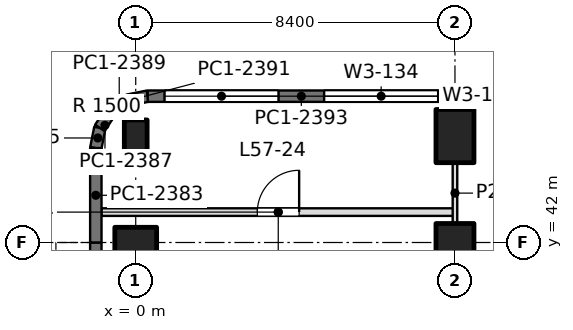
"""IFC4 building model, lengths in metres.
Left out: names, types, materials, properties, quantities, classifications, styles, units other than length and angle.
Written with IfcOpenShell. Run it as: python <this file> out.ifc"""

import sys

from ifc_helpers import new_model, si_unit, direction, frame, frame_2d, origin, origin_2d, place, context, subcontext, project, spatial, rectangle, extrude, element, fill, save


model = new_model("IFC4")
c1 = context("Model", 3, precision=1e-05, world=origin(), true_north=direction((0.0, 1.0)))
c2 = subcontext(c1, "Body", "Model", "MODEL_VIEW")
j1 = project(units=[si_unit("LENGTHUNIT", "METRE"), si_unit("PLANEANGLEUNIT", "RADIAN")], contexts=[c1])
p1 = place(None, origin())
s1 = spatial("IfcSite", under=j1, at=p1, CompositionType="ELEMENT")
p2 = place(p1, origin())
s2 = spatial("IfcBuilding", under=s1, at=p2, CompositionType="ELEMENT")
p3 = place(p2, frame((0.0, 0.0, 250.2)))
s3 = spatial("IfcBuildingStorey", under=s2, at=p3, CompositionType="ELEMENT", Elevation=250.2)
p4 = place(p3, frame((0.0, 42.0, 0.0), z_axis=(0.0, 0.0, 1.0), x_axis=(0.0, 1.0, 0.0)))
e1 = element("IfcColumn", 1, at=p4, inside=s3, PredefinedType="COLUMN", context=c2, shape_type="SweptSolid", body=[
    extrude(rectangle(XDim=0.8, YDim=1.1, at=origin_2d()), origin(), (0.0, 0.0, 1.0), 4.5),
])
p5 = place(p3, frame((0.0, 44.8, 0.0), z_axis=(0.0, 0.0, 1.0), x_axis=(1.0, 0.0, 0.0)))
e2 = element("IfcColumn", 2, at=p5, inside=s3, PredefinedType="COLUMN", context=c2, shape_type="SweptSolid", body=[
    extrude(rectangle(XDim=0.6, YDim=0.85, at=origin_2d()), origin(), (0.0, 0.0, 1.0), 4.5),
])
p6 = place(p3, frame((8.4, 42.0, 0.0), z_axis=(0.0, 0.0, 1.0), x_axis=(1.0, 0.0, 0.0)))
e3 = element("IfcColumn", 3, at=p6, inside=s3, PredefinedType="COLUMN", context=c2, shape_type="SweptSolid", body=[
    extrude(rectangle(XDim=1.0, YDim=1.0, at=origin_2d()), origin(), (0.0, 0.0, 1.0), 4.5),
])
p7 = place(p3, frame((8.4, 44.8, 0.0), z_axis=(0.0, 0.0, 1.0), x_axis=(1.0, 0.0, 0.0)))
e4 = element("IfcColumn", 4, at=p7, inside=s3, PredefinedType="COLUMN", context=c2, shape_type="SweptSolid", body=[
    extrude(rectangle(XDim=1.0, YDim=1.4, at=origin_2d()), origin(), (0.0, 0.0, 1.0), 4.5),
])
p8 = place(p3, frame((-1.05, 37.65, 0.0), z_axis=(0.0, 0.0, 1.0), x_axis=(0.0, 1.0, 0.0)))
e5 = element("IfcWall", 5, at=p8, inside=s3, PredefinedType="SOLIDWALL", context=c2, shape_type="SweptSolid", body=[
    extrude(rectangle(XDim=4.35, YDim=0.3, at=frame_2d((2.175, 0.0))), origin(), (0.0, 0.0, 1.0), 4.35),
])
p9 = place(p8, frame((0.975, 0.0, 0.9)))
e6 = element("IfcOpeningElement", 6, at=p9, cuts=e5, PredefinedType="OPENING", context=c2, shape_type="SweptSolid", body=[
    extrude(rectangle(XDim=2.4, YDim=1.9, at=frame_2d((1.2, 0.95))), frame((0.0, 0.16, 0.0), z_axis=(0.0, -1.0, 0.0), x_axis=(1.0, 0.0, 0.0)), (0.0, 0.0, 1.0), 0.32),
])
p10 = place(p3, frame((-1.05, 42.0, 0.0), z_axis=(0.0, 0.0, 1.0), x_axis=(0.0, 1.0, 0.0)))
e7 = element("IfcWall", 7, at=p10, inside=s3, PredefinedType="SOLIDWALL", context=c2, shape_type="SweptSolid", body=[
    extrude(rectangle(XDim=2.485, YDim=0.3, at=frame_2d((1.243, 0.0))), origin(), (0.0, 0.0, 1.0), 4.35),
])
p11 = place(p3, frame((-1.05, 44.485, 0.0), z_axis=(0.0, 0.0, 1.0), x_axis=(0.195073962632, 0.980788534345, 0.0)))
e8 = element("IfcWall", 8, at=p11, inside=s3, PredefinedType="SOLIDWALL", context=c2, shape_type="SweptSolid", body=[
    extrude(rectangle(XDim=0.541, YDim=0.3, at=frame_2d((0.271, 0.0))), origin(), (0.0, 0.0, 1.0), 4.35),
])
p12 = place(p3, frame((-0.945, 45.015, 0.0), z_axis=(0.0, 0.0, 1.0), x_axis=(0.55534295404, 0.831621430339, 0.0)))
e9 = element("IfcWall", 9, at=p12, inside=s3, PredefinedType="SOLIDWALL", context=c2, shape_type="SweptSolid", body=[
    extrude(rectangle(XDim=0.526, YDim=0.3, at=frame_2d((0.263, 0.0))), origin(), (0.0, 0.0, 1.0), 4.35),
])
p13 = place(p3, frame((-0.653, 45.453, 0.0), z_axis=(0.0, 0.0, 1.0), x_axis=(0.831692711774, 0.555236195849, 0.0)))
e10 = element("IfcWall", 10, at=p13, inside=s3, PredefinedType="SOLIDWALL", context=c2, shape_type="SweptSolid", body=[
    extrude(rectangle(XDim=0.525, YDim=0.3, at=frame_2d((0.263, 0.0))), origin(), (0.0, 0.0, 1.0), 4.35),
])
p14 = place(p3, frame((-0.216, 45.744, 0.0), z_axis=(0.0, 0.0, 1.0), x_axis=(0.980702050465, 0.1955082817, 0.0)))
e11 = element("IfcWall", 11, at=p14, inside=s3, PredefinedType="SOLIDWALL", context=c2, shape_type="SweptSolid", body=[
    extrude(rectangle(XDim=0.541, YDim=0.3, at=frame_2d((0.271, 0.0))), origin(), (0.0, 0.0, 1.0), 4.35),
])
p15 = place(p3, frame((0.315, 45.85, 0.0), z_axis=(0.0, 0.0, 1.0), x_axis=(1.0, 0.0, 0.0)))
e12 = element("IfcWall", 12, at=p15, inside=s3, PredefinedType="SOLIDWALL", context=c2, shape_type="SweptSolid", body=[
    extrude(rectangle(XDim=8.085, YDim=0.3, at=frame_2d((4.042, 0.0))), origin(), (0.0, 0.0, 1.0), 4.35),
])
p16 = place(p15, frame((0.443, 0.0, 0.9)))
e13 = element("IfcOpeningElement", 13, at=p16, cuts=e12, PredefinedType="OPENING", context=c2, shape_type="SweptSolid", body=[
    extrude(rectangle(XDim=3.0, YDim=2.4, at=frame_2d((1.5, 1.2))), frame((0.0, 0.16, 0.0), z_axis=(0.0, -1.0, 0.0), x_axis=(1.0, 0.0, 0.0)), (0.0, 0.0, 1.0), 0.32),
])
p17 = place(p15, frame((4.643, 0.0, 0.9)))
e14 = element("IfcOpeningElement", 14, at=p17, cuts=e12, PredefinedType="OPENING", context=c2, shape_type="SweptSolid", body=[
    extrude(rectangle(XDim=3.0, YDim=2.4, at=frame_2d((1.5, 1.2))), frame((0.0, 0.16, 0.0), z_axis=(0.0, -1.0, 0.0), x_axis=(1.0, 0.0, 0.0)), (0.0, 0.0, 1.0), 0.32),
])
p18 = place(p3, frame((8.4, 45.85, 0.0), z_axis=(0.0, 0.0, 1.0), x_axis=(1.0, 0.0, 0.0)))
e15 = element("IfcWall", 15, at=p18, inside=s3, PredefinedType="SOLIDWALL", context=c2, shape_type="SweptSolid", body=[
    extrude(rectangle(XDim=8.4, YDim=0.3, at=frame_2d((4.2, 0.0))), origin(), (0.0, 0.0, 1.0), 4.35),
])
p19 = place(p18, frame((0.6, 0.0, 0.9)))
e16 = element("IfcOpeningElement", 16, at=p19, cuts=e15, PredefinedType="OPENING", context=c2, shape_type="SweptSolid", body=[
    extrude(rectangle(XDim=3.0, YDim=2.4, at=frame_2d((1.5, 1.2))), frame((0.0, 0.16, 0.0), z_axis=(0.0, -1.0, 0.0), x_axis=(1.0, 0.0, 0.0)), (0.0, 0.0, 1.0), 0.32),
])
p20 = place(p18, frame((4.8, 0.0, 0.9)))
e17 = element("IfcOpeningElement", 17, at=p20, cuts=e15, PredefinedType="OPENING", context=c2, shape_type="SweptSolid", body=[
    extrude(rectangle(XDim=3.0, YDim=2.4, at=frame_2d((1.5, 1.2))), frame((0.0, 0.16, 0.0), z_axis=(0.0, -1.0, 0.0), x_axis=(1.0, 0.0, 0.0)), (0.0, 0.0, 1.0), 0.32),
])
p21 = place(p3, frame((-0.902, 42.8, 0.0), z_axis=(0.0, 0.0, 1.0), x_axis=(1.0, 0.0, 0.0)))
e18 = element("IfcWall", 18, at=p21, inside=s3, PredefinedType="PARTITIONING", context=c2, shape_type="SweptSolid", body=[
    extrude(rectangle(XDim=9.302, YDim=0.2, at=frame_2d((4.651, 0.0))), origin(), (0.0, 0.0, 1.0), 3.86),
])
p22 = place(p21, frame((4.102, 0.0, 0.0)))
e19 = element("IfcOpeningElement", 19, at=p22, cuts=e18, PredefinedType="OPENING", context=c2, shape_type="SweptSolid", body=[
    extrude(rectangle(XDim=1.1, YDim=2.4, at=frame_2d((0.55, 1.2))), frame((0.0, 0.11, 0.0), z_axis=(0.0, -1.0, 0.0), x_axis=(1.0, 0.0, 0.0)), (0.0, 0.0, 1.0), 0.22),
])
p23 = place(p3, frame((8.4, 42.498, 0.0), z_axis=(0.0, 0.0, 1.0), x_axis=(0.0, 1.0, 0.0)))
e20 = element("IfcWall", 20, at=p23, inside=s3, PredefinedType="PARTITIONING", context=c2, shape_type="SweptSolid", body=[
    extrude(rectangle(XDim=1.603, YDim=0.12, at=frame_2d((0.802, 0.0))), origin(), (0.0, 0.0, 1.0), 3.99),
])
p24 = place(p16, origin())
e21 = element("IfcWindow", 21, at=p24, inside=s3, PartitioningType="SINGLE_PANEL", PredefinedType="WINDOW", context=c2, shape_type="SweptSolid", body=[
    extrude(rectangle(XDim=3.0, YDim=2.4, at=frame_2d((1.5, 1.2))), frame((0.0, 0.03, 0.0), z_axis=(0.0, -1.0, 0.0), x_axis=(1.0, 0.0, 0.0)), (0.0, 0.0, 1.0), 0.06),
])
fill(e13, e21)
p25 = place(p17, origin())
e22 = element("IfcWindow", 22, at=p25, inside=s3, PartitioningType="SINGLE_PANEL", PredefinedType="WINDOW", context=c2, shape_type="SweptSolid", body=[
    extrude(rectangle(XDim=3.0, YDim=2.4, at=frame_2d((1.5, 1.2))), frame((0.0, 0.03, 0.0), z_axis=(0.0, -1.0, 0.0), x_axis=(1.0, 0.0, 0.0)), (0.0, 0.0, 1.0), 0.06),
])
fill(e14, e22)
p26 = place(p19, origin())
e23 = element("IfcWindow", 23, at=p26, inside=s3, PartitioningType="SINGLE_PANEL", PredefinedType="WINDOW", context=c2, shape_type="SweptSolid", body=[
    extrude(rectangle(XDim=3.0, YDim=2.4, at=frame_2d((1.5, 1.2))), frame((0.0, 0.03, 0.0), z_axis=(0.0, -1.0, 0.0), x_axis=(1.0, 0.0, 0.0)), (0.0, 0.0, 1.0), 0.06),
])
fill(e16, e23)
p27 = place(p22, origin())
e24 = element("IfcDoor", 24, at=p27, inside=s3, OperationType="SINGLE_SWING_RIGHT", PredefinedType="DOOR", context=c2, shape_type="SweptSolid", body=[
    extrude(rectangle(XDim=1.1, YDim=2.4, at=frame_2d((0.55, 1.2))), frame((0.0, 0.025, 0.0), z_axis=(0.0, -1.0, 0.0), x_axis=(1.0, 0.0, 0.0)), (0.0, 0.0, 1.0), 0.05),
])
fill(e19, e24)
save(model, sys.argv[1])
